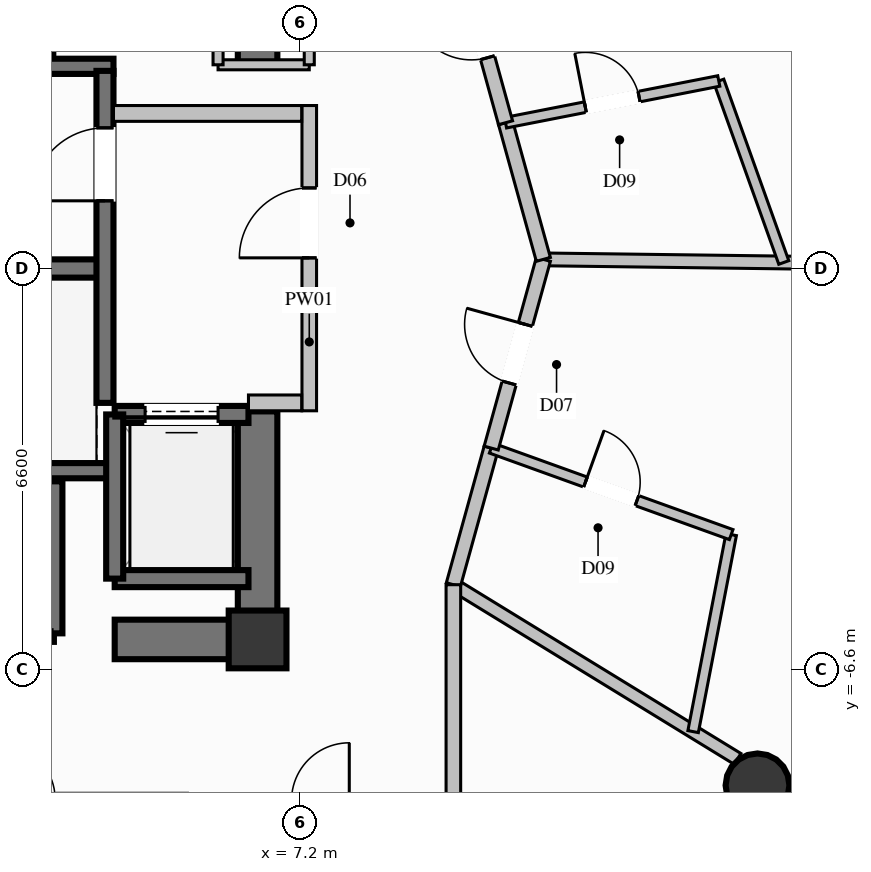
"""IFC4 building model, lengths in metres.
Left out: names, types, materials, properties, quantities, classifications, styles, units other than length and angle.
Written with IfcOpenShell. Run it as: python <this file> out.ifc"""

import sys

from ifc_helpers import new_model, si_unit, direction, frame, frame_2d, origin, origin_2d, place, context, subcontext, project, spatial, rectangle, circle, extrude, element, fill, save


model = new_model("IFC4")
c1 = context("Model", 3, precision=1e-05, world=origin(), true_north=direction((0.0, 1.0)))
c2 = subcontext(c1, "Body", "Model", "MODEL_VIEW")
j1 = project(units=[si_unit("LENGTHUNIT", "METRE"), si_unit("PLANEANGLEUNIT", "RADIAN")], contexts=[c1])
p1 = place(None, origin())
s1 = spatial("IfcSite", under=j1, at=p1, CompositionType="ELEMENT")
p2 = place(p1, origin())
s2 = spatial("IfcBuilding", under=s1, at=p2, CompositionType="ELEMENT")
p3 = place(p2, frame((0.0, 0.0, 156.6)))
s3 = spatial("IfcBuildingStorey", under=s2, at=p3, CompositionType="ELEMENT", Elevation=156.6)
p4 = place(p3, frame((6.5, -6.1, 0.0), z_axis=(0.0, 0.0, 1.0), x_axis=(1.0, 0.0, 0.0)))
e1 = element("IfcColumn", 1, at=p4, inside=s3, PredefinedType="COLUMN", context=c2, shape_type="SweptSolid", body=[
    extrude(rectangle(XDim=0.95, YDim=0.95, at=origin_2d()), origin(), (0.0, 0.0, 1.0), 3.6),
])
p5 = place(p3, frame((-3.99, 0.0, 0.0), z_axis=(0.0, 0.0, 1.0), x_axis=(1.0, 0.0, 0.0)))
e2 = element("IfcWall", 2, at=p5, inside=s3, PredefinedType="SHEAR", context=c2, shape_type="SweptSolid", body=[
    extrude(rectangle(XDim=7.98, YDim=0.3, at=frame_2d((3.99, 0.0))), origin(), (0.0, 0.0, 1.0), 3.6),
])
for number, where, z_axis, x_axis in (
    (3, (-4.13, -3.325, 0.0), (0.0, 0.0, 1.0), (1.0, 0.0, 0.0)),
    (4, (-4.13, 3.325, 0.0), (0.0, 0.0, 1.0), (1.0, 0.0, 0.0)),
):
    element("IfcWall", number, at=place(p3, frame(where, z_axis=z_axis, x_axis=x_axis)), inside=s3, PredefinedType="SOLIDWALL", context=c2, shape_type="SweptSolid", body=[
        extrude(rectangle(XDim=8.26, YDim=0.25, at=frame_2d((4.13, 0.0))), origin(), (0.0, 0.0, 1.0), 3.6),
    ])
p6 = place(p3, frame((4.15, -6.1, 0.0), z_axis=(0.0, 0.0, 1.0), x_axis=(1.0, 0.0, 0.0)))
e5 = element("IfcWall", 5, at=p6, inside=s3, PredefinedType="SHEAR", context=c2, shape_type="SweptSolid", body=[
    extrude(rectangle(XDim=2.025, YDim=0.65, at=frame_2d((1.013, 0.0))), origin(), (0.0, 0.0, 1.0), 3.6),
])
p7 = place(p3, frame((6.5, -6.425, 0.0), z_axis=(0.0, 0.0, 1.0), x_axis=(0.0, 1.0, 0.0)))
e6 = element("IfcWall", 6, at=p7, inside=s3, PredefinedType="SHEAR", context=c2, shape_type="SweptSolid", body=[
    extrude(rectangle(XDim=4.075, YDim=0.65, at=frame_2d((2.038, 0.0))), origin(), (0.0, 0.0, 1.0), 3.6),
])
p8 = place(p3, frame((6.5, 3.35, 0.0), z_axis=(0.0, 0.0, 1.0), x_axis=(0.0, 1.0, 0.0)))
e7 = element("IfcWall", 7, at=p8, inside=s3, PredefinedType="SHEAR", context=c2, shape_type="SweptSolid", body=[
    extrude(rectangle(XDim=3.075, YDim=0.65, at=frame_2d((1.538, 0.0))), origin(), (0.0, 0.0, 1.0), 3.6),
])
p9 = place(p3, frame((14.722, -8.5, 0.0), z_axis=(0.0, 0.0, 1.0), x_axis=(1.0, 0.0, 0.0)))
e8 = element("IfcColumn", 8, at=p9, inside=s3, PredefinedType="COLUMN", context=c2, shape_type="SweptSolid", body=[
    extrude(circle(Radius=0.525, at=origin_2d()), origin(), (0.0, 0.0, 1.0), 3.6),
])
p10 = place(p3, frame((1.05, -6.0, 0.0), z_axis=(0.0, 0.0, 1.0), x_axis=(1.0, 0.0, 0.0)))
e9 = element("IfcWall", 9, at=p10, inside=s3, PredefinedType="SOLIDWALL", context=c2, shape_type="SweptSolid", body=[
    extrude(rectangle(XDim=2.1, YDim=0.28, at=frame_2d((1.05, 0.0))), origin(), (0.0, 0.0, 1.0), 3.35),
])
p11 = place(p10, frame((0.5, 0.0, 0.0)))
e10 = element("IfcOpeningElement", 10, at=p11, cuts=e9, PredefinedType="OPENING", context=c2, shape_type="SweptSolid", body=[
    extrude(rectangle(XDim=1.1, YDim=2.2, at=frame_2d((0.55, 1.1))), frame((0.0, 0.15, 0.0), z_axis=(0.0, -1.0, 0.0), x_axis=(1.0, 0.0, 0.0)), (0.0, 0.0, 1.0), 0.3),
])
for number, where, z_axis, x_axis in (
    (11, (3.15, -6.0, 0.0), (0.0, 0.0, 1.0), (0.0, 1.0, 0.0)),
    (12, (3.0, 3.5, 0.0), (0.0, 0.0, 1.0), (0.0, 1.0, 0.0)),
):
    element("IfcWall", number, at=place(p3, frame(where, z_axis=z_axis, x_axis=x_axis)), inside=s3, PredefinedType="SOLIDWALL", context=c2, shape_type="SweptSolid", body=[
        extrude(rectangle(XDim=2.5, YDim=0.28, at=frame_2d((1.25, 0.0))), origin(), (0.0, 0.0, 1.0), 3.35),
    ])
p12 = place(p3, frame((4.15, -5.1, 0.0), z_axis=(0.0, 0.0, 1.0), x_axis=(1.0, 0.0, 0.0)))
e13 = element("IfcWall", 13, at=p12, inside=s3, PredefinedType="SOLIDWALL", context=c2, shape_type="SweptSolid", body=[
    extrude(rectangle(XDim=2.2, YDim=0.28, at=frame_2d((1.1, 0.0))), origin(), (0.0, 0.0, 1.0), 3.35),
])
p13 = place(p3, frame((6.35, -2.4, 0.0), z_axis=(0.0, 0.0, 1.0), x_axis=(-1.0, 0.0, 0.0)))
e14 = element("IfcWall", 14, at=p13, inside=s3, PredefinedType="SOLIDWALL", context=c2, shape_type="SweptSolid", body=[
    extrude(rectangle(XDim=2.2, YDim=0.28, at=frame_2d((1.1, 0.0))), origin(), (0.0, 0.0, 1.0), 3.35),
])
p14 = place(p13, frame((0.5, 0.0, 0.0)))
e15 = element("IfcOpeningElement", 15, at=p14, cuts=e14, PredefinedType="OPENING", context=c2, shape_type="SweptSolid", body=[
    extrude(rectangle(XDim=1.2, YDim=2.2, at=frame_2d((0.6, 1.1))), frame((0.0, 0.15, 0.0), z_axis=(0.0, -1.0, 0.0), x_axis=(1.0, 0.0, 0.0)), (0.0, 0.0, 1.0), 0.3),
])
p15 = place(p3, frame((4.15, -2.4, 0.0), z_axis=(0.0, 0.0, 1.0), x_axis=(0.0, -1.0, 0.0)))
e16 = element("IfcWall", 16, at=p15, inside=s3, PredefinedType="SOLIDWALL", context=c2, shape_type="SweptSolid", body=[
    extrude(rectangle(XDim=2.7, YDim=0.28, at=frame_2d((1.35, 0.0))), origin(), (0.0, 0.0, 1.0), 3.35),
])
p16 = place(p3, frame((3.99, -2.21, 0.0), z_axis=(0.0, 0.0, 1.0), x_axis=(0.0, 1.0, 0.0)))
e17 = element("IfcWall", 17, at=p16, inside=s3, PredefinedType="SOLIDWALL", context=c2, shape_type="SweptSolid", body=[
    extrude(rectangle(XDim=5.46, YDim=0.28, at=frame_2d((2.73, 0.0))), origin(), (0.0, 0.0, 1.0), 3.35),
])
p17 = place(p16, frame((3.323, 0.0, 0.0)))
e18 = element("IfcOpeningElement", 18, at=p17, cuts=e17, PredefinedType="OPENING", context=c2, shape_type="SweptSolid", body=[
    extrude(rectangle(XDim=1.2, YDim=2.2, at=frame_2d((0.6, 1.1))), frame((0.0, 0.15, 0.0), z_axis=(0.0, -1.0, 0.0), x_axis=(1.0, 0.0, 0.0)), (0.0, 0.0, 1.0), 0.3),
])
p18 = place(p3, frame((7.35, -2.34, 0.0), z_axis=(0.0, 0.0, 1.0), x_axis=(0.0, 1.0, 0.0)))
e19 = element("IfcWall", 19, at=p18, inside=s3, PredefinedType="PARTITIONING", context=c2, shape_type="SweptSolid", body=[
    extrude(rectangle(XDim=5.02, YDim=0.24, at=frame_2d((2.51, 0.0))), origin(), (0.0, 0.0, 1.0), 2.435),
])
p19 = place(p18, frame((2.515, 0.0, 0.0)))
e20 = element("IfcOpeningElement", 20, at=p19, cuts=e19, PredefinedType="OPENING", context=c2, shape_type="SweptSolid", body=[
    extrude(rectangle(XDim=1.15, YDim=2.2, at=frame_2d((0.575, 1.1))), frame((0.0, 0.13, 0.0), z_axis=(0.0, -1.0, 0.0), x_axis=(1.0, 0.0, 0.0)), (0.0, 0.0, 1.0), 0.26),
])
p20 = place(p3, frame((6.35, -2.21, 0.0), z_axis=(0.0, 0.0, 1.0), x_axis=(1.0, 0.0, 0.0)))
e21 = element("IfcWall", 21, at=p20, inside=s3, PredefinedType="PARTITIONING", context=c2, shape_type="SweptSolid", body=[
    extrude(rectangle(XDim=0.875, YDim=0.26, at=frame_2d((0.438, 0.0))), origin(), (0.0, 0.0, 1.0), 3.35),
])
p21 = place(p3, frame((4.13, 2.55, 0.0), z_axis=(0.0, 0.0, 1.0), x_axis=(1.0, 0.0, 0.0)))
e22 = element("IfcWall", 22, at=p21, inside=s3, PredefinedType="PARTITIONING", context=c2, shape_type="SweptSolid", body=[
    extrude(rectangle(XDim=3.095, YDim=0.26, at=frame_2d((1.548, 0.0))), origin(), (0.0, 0.0, 1.0), 3.35),
])
p22 = place(p3, frame((5.85, 3.35, 0.0), z_axis=(0.0, 0.0, 1.0), x_axis=(1.0, 0.0, 0.0)))
e23 = element("IfcWall", 23, at=p22, inside=s3, PredefinedType="PARTITIONING", context=c2, shape_type="SweptSolid", body=[
    extrude(rectangle(XDim=1.5, YDim=0.165, at=frame_2d((0.75, 0.0))), origin(), (0.0, 0.0, 1.0), 3.35),
])
p23 = place(p3, frame((7.35, 3.35, 0.0), z_axis=(0.0, 0.0, 1.0), x_axis=(0.0, 1.0, 0.0)))
e24 = element("IfcWall", 24, at=p23, inside=s3, PredefinedType="PARTITIONING", context=c2, shape_type="SweptSolid", body=[
    extrude(rectangle(XDim=1.95, YDim=0.165, at=frame_2d((0.975, 0.0))), origin(), (0.0, 0.0, 1.0), 3.35),
])
p24 = place(p23, frame((0.5, 0.0, 0.0)))
e25 = element("IfcOpeningElement", 25, at=p24, cuts=e24, PredefinedType="OPENING", context=c2, shape_type="SweptSolid", body=[
    extrude(rectangle(XDim=0.95, YDim=2.1, at=frame_2d((0.475, 1.05))), frame((0.0, 0.093, 0.0), z_axis=(0.0, -1.0, 0.0), x_axis=(1.0, 0.0, 0.0)), (0.0, 0.0, 1.0), 0.185),
])
p25 = place(p3, frame((5.85, 5.3, 0.0), z_axis=(0.0, 0.0, 1.0), x_axis=(0.0, -1.0, 0.0)))
e26 = element("IfcWall", 26, at=p25, inside=s3, PredefinedType="PARTITIONING", context=c2, shape_type="SweptSolid", body=[
    extrude(rectangle(XDim=1.95, YDim=0.165, at=frame_2d((0.975, 0.0))), origin(), (0.0, 0.0, 1.0), 2.435),
])
p26 = place(p3, frame((11.2, 0.15, 0.0), z_axis=(0.0, 0.0, 1.0), x_axis=(0.99991679467, -0.012899757247, 0.0)))
e27 = element("IfcWall", 27, at=p26, inside=s3, PredefinedType="PARTITIONING", context=c2, shape_type="SweptSolid", body=[
    extrude(rectangle(XDim=5.261, YDim=0.21, at=frame_2d((2.631, 0.0))), origin(), (0.0, 0.0, 1.0), 3.35),
])
p27 = place(p3, frame((9.72, -5.2, 0.0), z_axis=(0.0, 0.0, 1.0), x_axis=(0.852582050819, -0.52259338555, 0.0)))
e28 = element("IfcWall", 28, at=p27, inside=s3, PredefinedType="PARTITIONING", context=c2, shape_type="SweptSolid", body=[
    extrude(rectangle(XDim=5.482, YDim=0.21, at=frame_2d((2.741, 0.0))), origin(), (0.0, 0.0, 1.0), 2.717),
])
p28 = place(p3, frame((15.259, -8.595, 0.0), z_axis=(0.0, 0.0, 1.0), x_axis=(0.852624466561, -0.522524180322, 0.0)))
e29 = element("IfcWall", 29, at=p28, inside=s3, PredefinedType="PARTITIONING", context=c2, shape_type="SweptSolid", body=[
    extrude(rectangle(XDim=7.104, YDim=0.21, at=frame_2d((3.552, 0.0))), origin(), (0.0, 0.0, 1.0), 3.35),
])
p29 = place(p3, frame((9.72, -5.2, 0.0), z_axis=(0.0, 0.0, 1.0), x_axis=(0.266801280383, 0.963751563831, 0.0)))
e30 = element("IfcWall", 30, at=p29, inside=s3, PredefinedType="PARTITIONING", context=c2, shape_type="SweptSolid", body=[
    extrude(rectangle(XDim=2.332, YDim=0.24, at=frame_2d((1.166, 0.0))), origin(), (0.0, 0.0, 1.0), 3.35),
])
p30 = place(p3, frame((13.663, -7.616, 0.0), z_axis=(0.0, 0.0, 1.0), x_axis=(0.189695238056, 0.981843020375, 0.0)))
e31 = element("IfcWall", 31, at=p30, inside=s3, PredefinedType="PLUMBINGWALL", context=c2, shape_type="SweptSolid", body=[
    extrude(rectangle(XDim=3.3, YDim=0.175, at=frame_2d((1.65, 0.0))), origin(), (0.0, 0.0, 1.0), 3.35),
])
p31 = place(p3, frame((10.342, -2.953, 0.0), z_axis=(0.0, 0.0, 1.0), x_axis=(0.940722627473, -0.33917685381, 0.0)))
e32 = element("IfcWall", 32, at=p31, inside=s3, PredefinedType="PLUMBINGWALL", context=c2, shape_type="SweptSolid", body=[
    extrude(rectangle(XDim=4.196, YDim=0.175, at=frame_2d((2.098, 0.0))), origin(), (0.0, 0.0, 1.0), 3.35),
])
p32 = place(p31, frame((1.648, 0.0, 0.0)))
e33 = element("IfcOpeningElement", 33, at=p32, cuts=e32, PredefinedType="OPENING", context=c2, shape_type="SweptSolid", body=[
    extrude(rectangle(XDim=0.9, YDim=2.1, at=frame_2d((0.45, 1.05))), frame((0.0, 0.098, 0.0), z_axis=(0.0, -1.0, 0.0), x_axis=(1.0, 0.0, 0.0)), (0.0, 0.0, 1.0), 0.195),
])
p33 = place(p3, frame((10.342, -2.953, 0.0), z_axis=(0.0, 0.0, 1.0), x_axis=(0.266497617314, 0.963835577246, 0.0)))
e34 = element("IfcWall", 34, at=p33, inside=s3, PredefinedType="PARTITIONING", context=c2, shape_type="SweptSolid", body=[
    extrude(rectangle(XDim=3.219, YDim=0.24, at=frame_2d((1.61, 0.0))), origin(), (0.0, 0.0, 1.0), 3.35),
])
p34 = place(p33, frame((1.11, 0.0, 0.0)))
e35 = element("IfcOpeningElement", 35, at=p34, cuts=e34, PredefinedType="OPENING", context=c2, shape_type="SweptSolid", body=[
    extrude(rectangle(XDim=1.0, YDim=2.2, at=frame_2d((0.5, 1.1))), frame((0.0, 0.13, 0.0), z_axis=(0.0, -1.0, 0.0), x_axis=(1.0, 0.0, 0.0)), (0.0, 0.0, 1.0), 0.26),
])
p35 = place(p3, frame((11.2, 0.15, 0.0), z_axis=(0.0, 0.0, 1.0), x_axis=(-0.266801280383, 0.963751563831, 0.0)))
e36 = element("IfcWall", 36, at=p35, inside=s3, PredefinedType="PARTITIONING", context=c2, shape_type="SweptSolid", body=[
    extrude(rectangle(XDim=2.332, YDim=0.24, at=frame_2d((1.166, 0.0))), origin(), (0.0, 0.0, 1.0), 3.35),
])
p36 = place(p3, frame((15.154, 0.099, 0.0), z_axis=(0.0, 0.0, 1.0), x_axis=(-0.337194784979, 0.94143490321, 0.0)))
e37 = element("IfcWall", 37, at=p36, inside=s3, PredefinedType="PLUMBINGWALL", context=c2, shape_type="SweptSolid", body=[
    extrude(rectangle(XDim=3.171, YDim=0.175, at=frame_2d((1.585, 0.0))), origin(), (0.0, 0.0, 1.0), 3.35),
])
p37 = place(p3, frame((10.578, 2.397, 0.0), z_axis=(0.0, 0.0, 1.0), x_axis=(0.981348131886, 0.192239028411, 0.0)))
e38 = element("IfcWall", 38, at=p37, inside=s3, PredefinedType="PLUMBINGWALL", context=c2, shape_type="SweptSolid", body=[
    extrude(rectangle(XDim=3.574, YDim=0.175, at=frame_2d((1.787, 0.0))), origin(), (0.0, 0.0, 1.0), 3.35),
])
p38 = place(p37, frame((1.337, 0.0, 0.0)))
e39 = element("IfcOpeningElement", 39, at=p38, cuts=e38, PredefinedType="OPENING", context=c2, shape_type="SweptSolid", body=[
    extrude(rectangle(XDim=0.9, YDim=2.1, at=frame_2d((0.45, 1.05))), frame((0.0, 0.098, 0.0), z_axis=(0.0, -1.0, 0.0), x_axis=(1.0, 0.0, 0.0)), (0.0, 0.0, 1.0), 0.195),
])
p39 = place(p3, frame((10.578, 2.397, 0.0), z_axis=(0.0, 0.0, 1.0), x_axis=(-0.266478138733, 0.963840962803, 0.0)))
e40 = element("IfcWall", 40, at=p39, inside=s3, PredefinedType="PARTITIONING", context=c2, shape_type="SweptSolid", body=[
    extrude(rectangle(XDim=3.219, YDim=0.24, at=frame_2d((1.61, 0.0))), origin(), (0.0, 0.0, 1.0), 3.35),
])
p40 = place(p39, frame((1.11, 0.0, 0.0)))
e41 = element("IfcOpeningElement", 41, at=p40, cuts=e40, PredefinedType="OPENING", context=c2, shape_type="SweptSolid", body=[
    extrude(rectangle(XDim=1.0, YDim=2.2, at=frame_2d((0.5, 1.1))), frame((0.0, 0.13, 0.0), z_axis=(0.0, -1.0, 0.0), x_axis=(1.0, 0.0, 0.0)), (0.0, 0.0, 1.0), 0.26),
])
p41 = place(p3, frame((9.72, -8.75, 0.0), z_axis=(0.0, 0.0, 1.0), x_axis=(0.0, 1.0, 0.0)))
e42 = element("IfcWall", 42, at=p41, inside=s3, PredefinedType="PARTITIONING", context=c2, shape_type="SweptSolid", body=[
    extrude(rectangle(XDim=3.55, YDim=0.24, at=frame_2d((1.775, 0.0))), origin(), (0.0, 0.0, 1.0), 3.35),
])
p42 = place(p14, origin())
e43 = element("IfcDoor", 43, at=p42, inside=s3, OperationType="SLIDING_TO_LEFT", PredefinedType="DOOR", context=c2, shape_type="SweptSolid", body=[
    extrude(rectangle(XDim=1.2, YDim=2.2, at=frame_2d((0.6, 1.1))), frame((0.0, 0.025, 0.0), z_axis=(0.0, -1.0, 0.0), x_axis=(1.0, 0.0, 0.0)), (0.0, 0.0, 1.0), 0.05),
])
fill(e15, e43)
p43 = place(p17, origin())
e44 = element("IfcDoor", 44, at=p43, inside=s3, OperationType="SINGLE_SWING_LEFT", PredefinedType="DOOR", context=c2, shape_type="SweptSolid", body=[
    extrude(rectangle(XDim=1.2, YDim=2.2, at=frame_2d((0.6, 1.1))), frame((0.0, 0.025, 0.0), z_axis=(0.0, -1.0, 0.0), x_axis=(1.0, 0.0, 0.0)), (0.0, 0.0, 1.0), 0.05),
])
fill(e18, e44)
p44 = place(p19, origin())
e45 = element("IfcDoor", 45, at=p44, inside=s3, OperationType="SINGLE_SWING_LEFT", PredefinedType="DOOR", context=c2, shape_type="SweptSolid", body=[
    extrude(rectangle(XDim=1.15, YDim=2.2, at=frame_2d((0.575, 1.1))), frame((0.0, 0.025, 0.0), z_axis=(0.0, -1.0, 0.0), x_axis=(1.0, 0.0, 0.0)), (0.0, 0.0, 1.0), 0.05),
])
fill(e20, e45)
p45 = place(p32, origin())
e46 = element("IfcDoor", 46, at=p45, inside=s3, OperationType="SINGLE_SWING_LEFT", PredefinedType="DOOR", context=c2, shape_type="SweptSolid", body=[
    extrude(rectangle(XDim=0.9, YDim=2.1, at=frame_2d((0.45, 1.05))), frame((0.0, 0.025, 0.0), z_axis=(0.0, -1.0, 0.0), x_axis=(1.0, 0.0, 0.0)), (0.0, 0.0, 1.0), 0.05),
])
fill(e33, e46)
p46 = place(p34, origin())
e47 = element("IfcDoor", 47, at=p46, inside=s3, OperationType="SINGLE_SWING_RIGHT", PredefinedType="DOOR", context=c2, shape_type="SweptSolid", body=[
    extrude(rectangle(XDim=1.0, YDim=2.2, at=frame_2d((0.5, 1.1))), frame((0.0, 0.025, 0.0), z_axis=(0.0, -1.0, 0.0), x_axis=(1.0, 0.0, 0.0)), (0.0, 0.0, 1.0), 0.05),
])
fill(e35, e47)
p47 = place(p38, origin())
e48 = element("IfcDoor", 48, at=p47, inside=s3, OperationType="SINGLE_SWING_LEFT", PredefinedType="DOOR", context=c2, shape_type="SweptSolid", body=[
    extrude(rectangle(XDim=0.9, YDim=2.1, at=frame_2d((0.45, 1.05))), frame((0.0, 0.025, 0.0), z_axis=(0.0, -1.0, 0.0), x_axis=(1.0, 0.0, 0.0)), (0.0, 0.0, 1.0), 0.05),
])
fill(e39, e48)
p48 = place(p40, origin())
e49 = element("IfcDoor", 49, at=p48, inside=s3, OperationType="SINGLE_SWING_RIGHT", PredefinedType="DOOR", context=c2, shape_type="SweptSolid", body=[
    extrude(rectangle(XDim=1.0, YDim=2.2, at=frame_2d((0.5, 1.1))), frame((0.0, 0.025, 0.0), z_axis=(0.0, -1.0, 0.0), x_axis=(1.0, 0.0, 0.0)), (0.0, 0.0, 1.0), 0.05),
])
fill(e41, e49)
save(model, sys.argv[1])
